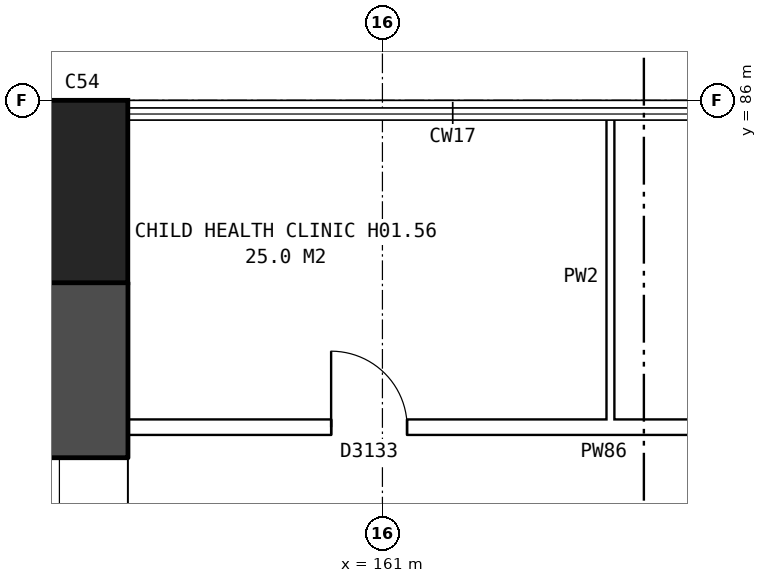
"""IFC4 building model, lengths in metres.
Left out: names, types, materials, properties, quantities, classifications, styles, units other than length and angle.
Written with IfcOpenShell. Run it as: python <this file> out.ifc"""

import sys

from ifc_helpers import new_model, si_unit, direction, frame, frame_2d, origin, origin_2d, place, context, subcontext, project, spatial, rectangle, extrude, element, fill, save


model = new_model("IFC4")
c1 = context("Model", 3, precision=1e-05, world=origin(), true_north=direction((0.0, 1.0)))
c2 = subcontext(c1, "Body", "Model", "MODEL_VIEW")
j1 = project(units=[si_unit("LENGTHUNIT", "METRE"), si_unit("PLANEANGLEUNIT", "RADIAN")], contexts=[c1])
p1 = place(None, origin())
s1 = spatial("IfcSite", under=j1, at=p1, CompositionType="ELEMENT")
p2 = place(p1, origin())
s2 = spatial("IfcBuilding", under=s1, at=p2, CompositionType="ELEMENT")
p3 = place(p2, frame((0.0, 0.0, 5.5)))
s3 = spatial("IfcBuildingStorey", under=s2, at=p3, CompositionType="ELEMENT", Elevation=5.5)
p4 = place(p3, frame((157.05, 84.8, -0.3), z_axis=(0.0, 0.0, 1.0), x_axis=(1.0, 0.0, 0.0)))
e1 = element("IfcColumn", 1, at=p4, inside=s3, PredefinedType="COLUMN", context=c2, shape_type="SweptSolid", body=[
    extrude(rectangle(XDim=1.2, YDim=2.4, at=origin_2d()), origin(), (0.0, 0.0, 1.0), 4.6),
])
p5 = place(p3, frame((157.05, 56.4, -0.3), z_axis=(0.0, 0.0, 1.0), x_axis=(0.0, 1.0, 0.0)))
e2 = element("IfcWall", 2, at=p5, inside=s3, PredefinedType="SHEAR", context=c2, shape_type="SweptSolid", body=[
    extrude(rectangle(XDim=27.2, YDim=1.2, at=frame_2d((13.6, 0.0))), origin(), (0.0, 0.0, 1.0), 4.6),
])
p6 = place(p5, frame((2.3, 0.0, 0.8)))
e3 = element("IfcOpeningElement", 3, at=p6, cuts=e2, PredefinedType="OPENING", context=c2, shape_type="SweptSolid", body=[
    extrude(rectangle(XDim=1.6, YDim=1.8, at=frame_2d((0.8, 0.9))), frame((0.0, 0.61, 0.0), z_axis=(0.0, -1.0, 0.0), x_axis=(1.0, 0.0, 0.0)), (0.0, 0.0, 1.0), 1.22),
])
p7 = place(p5, frame((5.3, 0.0, 0.8)))
e4 = element("IfcOpeningElement", 4, at=p7, cuts=e2, PredefinedType="OPENING", context=c2, shape_type="SweptSolid", body=[
    extrude(rectangle(XDim=1.6, YDim=1.8, at=frame_2d((0.8, 0.9))), frame((0.0, 0.61, 0.0), z_axis=(0.0, -1.0, 0.0), x_axis=(1.0, 0.0, 0.0)), (0.0, 0.0, 1.0), 1.22),
])
p8 = place(p5, frame((8.3, 0.0, 0.8)))
e5 = element("IfcOpeningElement", 5, at=p8, cuts=e2, PredefinedType="OPENING", context=c2, shape_type="SweptSolid", body=[
    extrude(rectangle(XDim=1.6, YDim=1.8, at=frame_2d((0.8, 0.9))), frame((0.0, 0.61, 0.0), z_axis=(0.0, -1.0, 0.0), x_axis=(1.0, 0.0, 0.0)), (0.0, 0.0, 1.0), 1.22),
])
p9 = place(p5, frame((11.3, 0.0, 0.8)))
e6 = element("IfcOpeningElement", 6, at=p9, cuts=e2, PredefinedType="OPENING", context=c2, shape_type="SweptSolid", body=[
    extrude(rectangle(XDim=1.6, YDim=1.8, at=frame_2d((0.8, 0.9))), frame((0.0, 0.61, 0.0), z_axis=(0.0, -1.0, 0.0), x_axis=(1.0, 0.0, 0.0)), (0.0, 0.0, 1.0), 1.22),
])
p10 = place(p5, frame((14.3, 0.0, 0.8)))
e7 = element("IfcOpeningElement", 7, at=p10, cuts=e2, PredefinedType="OPENING", context=c2, shape_type="SweptSolid", body=[
    extrude(rectangle(XDim=1.6, YDim=1.8, at=frame_2d((0.8, 0.9))), frame((0.0, 0.61, 0.0), z_axis=(0.0, -1.0, 0.0), x_axis=(1.0, 0.0, 0.0)), (0.0, 0.0, 1.0), 1.22),
])
p11 = place(p5, frame((17.3, 0.0, 0.8)))
e8 = element("IfcOpeningElement", 8, at=p11, cuts=e2, PredefinedType="OPENING", context=c2, shape_type="SweptSolid", body=[
    extrude(rectangle(XDim=1.6, YDim=1.8, at=frame_2d((0.8, 0.9))), frame((0.0, 0.61, 0.0), z_axis=(0.0, -1.0, 0.0), x_axis=(1.0, 0.0, 0.0)), (0.0, 0.0, 1.0), 1.22),
])
p12 = place(p5, frame((20.3, 0.0, 0.8)))
e9 = element("IfcOpeningElement", 9, at=p12, cuts=e2, PredefinedType="OPENING", context=c2, shape_type="SweptSolid", body=[
    extrude(rectangle(XDim=1.6, YDim=1.8, at=frame_2d((0.8, 0.9))), frame((0.0, 0.61, 0.0), z_axis=(0.0, -1.0, 0.0), x_axis=(1.0, 0.0, 0.0)), (0.0, 0.0, 1.0), 1.22),
])
p13 = place(p5, frame((23.3, 0.0, 0.8)))
e10 = element("IfcOpeningElement", 10, at=p13, cuts=e2, PredefinedType="OPENING", context=c2, shape_type="SweptSolid", body=[
    extrude(rectangle(XDim=1.6, YDim=1.8, at=frame_2d((0.8, 0.9))), frame((0.0, 0.61, 0.0), z_axis=(0.0, -1.0, 0.0), x_axis=(1.0, 0.0, 0.0)), (0.0, 0.0, 1.0), 1.22),
])
p14 = place(p3, frame((157.53, 81.7, 0.0), z_axis=(0.0, 0.0, 1.0), x_axis=(1.0, 0.0, 0.0)))
e11 = element("IfcWall", 11, at=p14, inside=s3, PredefinedType="PARTITIONING", context=c2, shape_type="SweptSolid", body=[
    extrude(rectangle(XDim=15.97, YDim=0.2, at=frame_2d((7.985, 0.0))), origin(), (0.0, 0.0, 1.0), 4.3),
])
p15 = place(p14, frame((2.795, 0.0, 0.0)))
e12 = element("IfcOpeningElement", 12, at=p15, cuts=e11, PredefinedType="OPENING", context=c2, shape_type="SweptSolid", body=[
    extrude(rectangle(XDim=1.0, YDim=2.1, at=frame_2d((0.5, 1.05))), frame((0.0, 0.11, 0.0), z_axis=(0.0, -1.0, 0.0), x_axis=(1.0, 0.0, 0.0)), (0.0, 0.0, 1.0), 0.22),
])
p16 = place(p14, frame((8.97, 0.0, 0.0)))
e13 = element("IfcOpeningElement", 13, at=p16, cuts=e11, PredefinedType="OPENING", context=c2, shape_type="SweptSolid", body=[
    extrude(rectangle(XDim=1.0, YDim=2.1, at=frame_2d((0.5, 1.05))), frame((0.0, 0.11, 0.0), z_axis=(0.0, -1.0, 0.0), x_axis=(1.0, 0.0, 0.0)), (0.0, 0.0, 1.0), 0.22),
])
p17 = place(p14, frame((13.67, 0.0, 0.0)))
e14 = element("IfcOpeningElement", 14, at=p17, cuts=e11, PredefinedType="OPENING", context=c2, shape_type="SweptSolid", body=[
    extrude(rectangle(XDim=1.0, YDim=2.1, at=frame_2d((0.5, 1.05))), frame((0.0, 0.11, 0.0), z_axis=(0.0, -1.0, 0.0), x_axis=(1.0, 0.0, 0.0)), (0.0, 0.0, 1.0), 0.22),
])
p18 = place(p3, frame((164.0, 81.6, 0.0), z_axis=(0.0, 0.0, 1.0), x_axis=(0.0, 1.0, 0.0)))
e15 = element("IfcWall", 15, at=p18, inside=s3, PredefinedType="PARTITIONING", context=c2, shape_type="SweptSolid", body=[
    extrude(rectangle(XDim=4.16, YDim=0.1, at=frame_2d((2.08, 0.0))), origin(), (0.0, 0.0, 1.0), 4.3),
])
p19 = place(p13, origin())
e16 = element("IfcWindow", 16, at=p19, inside=s3, PartitioningType="SINGLE_PANEL", PredefinedType="WINDOW", context=c2, shape_type="SweptSolid", body=[
    extrude(rectangle(XDim=1.6, YDim=1.8, at=frame_2d((0.8, 0.9))), frame((0.0, 0.33, 0.0), z_axis=(0.0, -1.0, 0.0), x_axis=(1.0, 0.0, 0.0)), (0.0, 0.0, 1.0), 0.06),
])
fill(e10, e16)
p20 = place(p15, origin())
e17 = element("IfcDoor", 17, at=p20, inside=s3, OperationType="SINGLE_SWING_LEFT", PredefinedType="DOOR", context=c2, shape_type="SweptSolid", body=[
    extrude(rectangle(XDim=1.0, YDim=2.1, at=frame_2d((0.5, 1.05))), frame((0.0, 0.025, 0.0), z_axis=(0.0, -1.0, 0.0), x_axis=(1.0, 0.0, 0.0)), (0.0, 0.0, 1.0), 0.05),
])
fill(e12, e17)
save(model, sys.argv[1])
